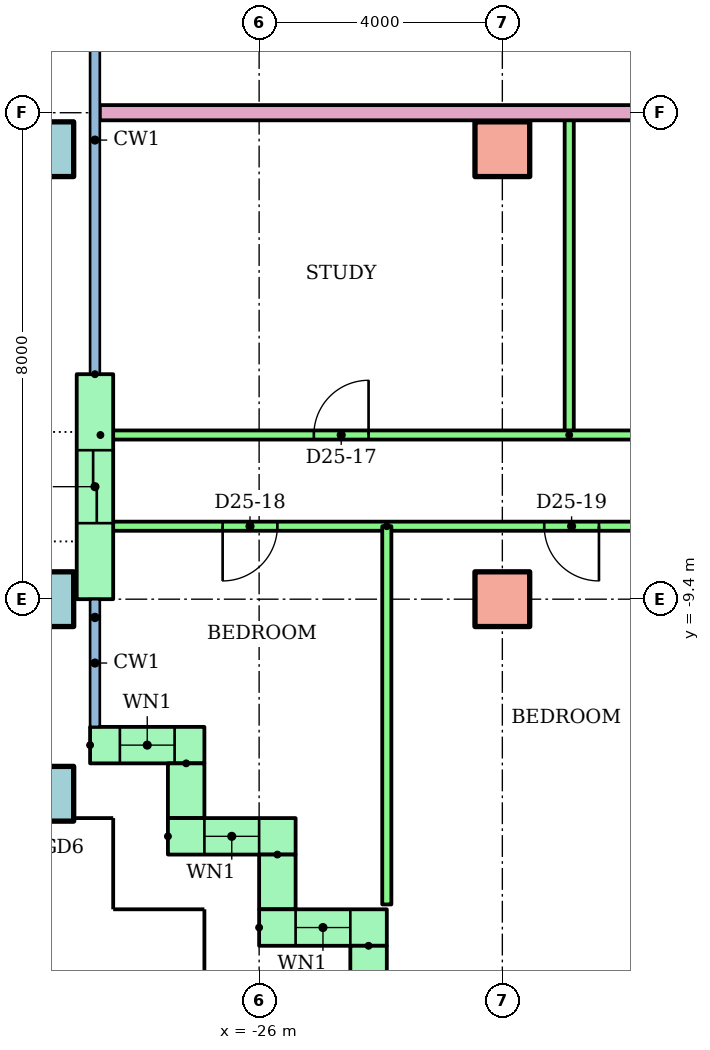
"""IFC4 building model, lengths in metres.
Left out: names, types, materials, properties, quantities, classifications, styles, units other than length and angle.
Written with IfcOpenShell. Run it as: python <this file> out.ifc"""

import sys

from ifc_helpers import new_model, si_unit, direction, frame, frame_2d, origin, origin_2d, place, context, subcontext, project, spatial, rectangle, hollow_rectangle, extrude, element, fill, save


model = new_model("IFC4")
c1 = context("Model", 3, precision=1e-05, world=origin(), true_north=direction((0.0, 1.0)))
c2 = subcontext(c1, "Body", "Model", "MODEL_VIEW")
j1 = project(units=[si_unit("LENGTHUNIT", "METRE"), si_unit("PLANEANGLEUNIT", "RADIAN")], contexts=[c1])
p1 = place(None, origin())
s1 = spatial("IfcSite", under=j1, at=p1, CompositionType="ELEMENT")
p2 = place(p1, origin())
s2 = spatial("IfcBuilding", under=s1, at=p2, CompositionType="ELEMENT")
p3 = place(p2, frame((0.0, 0.0, 96.7)))
s3 = spatial("IfcBuildingStorey", under=s2, at=p3, CompositionType="ELEMENT", Elevation=96.7)
for number, where in (
    (1, (-29.5, -12.6, 0.0)),
    (2, (-29.5, -9.4, 0.0)),
):
    element("IfcColumn", number, at=place(p3, frame(where)), inside=s3, PredefinedType="COLUMN", context=c2, shape_type="SweptSolid", body=[
        extrude(hollow_rectangle(XDim=0.9, YDim=0.9, WallThickness=0.045, at=origin_2d()), origin(), (0.0, 0.0, 1.0), 3.2),
    ])
p4 = place(p3, frame((-22.0, -9.4, 0.0)))
e3 = element("IfcColumn", 3, at=p4, inside=s3, PredefinedType="COLUMN", context=c2, shape_type="SweptSolid", body=[
    extrude(rectangle(XDim=0.9, YDim=0.9, at=origin_2d()), origin(), (0.0, 0.0, 1.0), 3.2),
])
p5 = place(p3, frame((-29.5, -2.0, 0.0)))
e4 = element("IfcColumn", 4, at=p5, inside=s3, PredefinedType="COLUMN", context=c2, shape_type="SweptSolid", body=[
    extrude(hollow_rectangle(XDim=0.9, YDim=0.9, WallThickness=0.045, at=origin_2d()), origin(), (0.0, 0.0, 1.0), 3.2),
])
p6 = place(p3, frame((-22.0, -2.0, 0.0)))
e5 = element("IfcColumn", 5, at=p6, inside=s3, PredefinedType="COLUMN", context=c2, shape_type="SweptSolid", body=[
    extrude(rectangle(XDim=0.9, YDim=0.9, at=origin_2d()), origin(), (0.0, 0.0, 1.0), 3.2),
])
p7 = place(p3, frame((-28.7, -5.7, 0.0), z_axis=(0.0, 0.0, 1.0), x_axis=(0.0, -1.0, 0.0)))
e6 = element("IfcWall", 6, at=p7, inside=s3, PredefinedType="STANDARD", context=c2, shape_type="SweptSolid", body=[
    extrude(rectangle(XDim=3.7, YDim=0.6, at=frame_2d((1.85, 0.0))), origin(), (0.0, 0.0, 1.0), 2.92),
])
p8 = place(p7, frame((1.25, 0.0, 0.0)))
e7 = element("IfcOpeningElement", 7, at=p8, cuts=e6, PredefinedType="OPENING", context=c2, shape_type="SweptSolid", body=[
    extrude(rectangle(XDim=1.2, YDim=2.1, at=frame_2d((0.6, 1.05))), frame((0.0, 0.31, 0.0), z_axis=(0.0, -1.0, 0.0), x_axis=(1.0, 0.0, 0.0)), (0.0, 0.0, 1.0), 0.62),
])
p9 = place(p3, frame((-28.78, -11.8, 0.0)))
e8 = element("IfcWall", 8, at=p9, inside=s3, PredefinedType="STANDARD", context=c2, shape_type="SweptSolid", body=[
    extrude(rectangle(XDim=1.88, YDim=0.6, at=frame_2d((0.94, 0.0))), origin(), (0.0, 0.0, 1.0), 2.92),
])
p10 = place(p9, frame((0.49, 0.0, 0.9)))
e9 = element("IfcOpeningElement", 9, at=p10, cuts=e8, PredefinedType="OPENING", context=c2, shape_type="SweptSolid", body=[
    extrude(rectangle(XDim=0.9, YDim=1.5, at=frame_2d((0.45, 0.75))), frame((0.0, 0.31, 0.0), z_axis=(0.0, -1.0, 0.0), x_axis=(1.0, 0.0, 0.0)), (0.0, 0.0, 1.0), 0.62),
])
p11 = place(p3, frame((-27.2, -12.1, 0.0), z_axis=(0.0, 0.0, 1.0), x_axis=(0.0, -1.0, 0.0)))
e10 = element("IfcWall", 10, at=p11, inside=s3, PredefinedType="STANDARD", context=c2, shape_type="SweptSolid", body=[
    extrude(rectangle(XDim=0.9, YDim=0.6, at=frame_2d((0.45, 0.0))), origin(), (0.0, 0.0, 1.0), 2.92),
])
p12 = place(p3, frame((-27.5, -13.3, 0.0)))
e11 = element("IfcWall", 11, at=p12, inside=s3, PredefinedType="STANDARD", context=c2, shape_type="SweptSolid", body=[
    extrude(rectangle(XDim=2.1, YDim=0.6, at=frame_2d((1.05, 0.0))), origin(), (0.0, 0.0, 1.0), 2.92),
])
p13 = place(p12, frame((0.6, 0.0, 0.9)))
e12 = element("IfcOpeningElement", 12, at=p13, cuts=e11, PredefinedType="OPENING", context=c2, shape_type="SweptSolid", body=[
    extrude(rectangle(XDim=0.9, YDim=1.5, at=frame_2d((0.45, 0.75))), frame((0.0, 0.31, 0.0), z_axis=(0.0, -1.0, 0.0), x_axis=(1.0, 0.0, 0.0)), (0.0, 0.0, 1.0), 0.62),
])
p14 = place(p3, frame((-25.7, -13.6, 0.0), z_axis=(0.0, 0.0, 1.0), x_axis=(0.0, -1.0, 0.0)))
e13 = element("IfcWall", 13, at=p14, inside=s3, PredefinedType="STANDARD", context=c2, shape_type="SweptSolid", body=[
    extrude(rectangle(XDim=0.9, YDim=0.6, at=frame_2d((0.45, 0.0))), origin(), (0.0, 0.0, 1.0), 2.92),
])
p15 = place(p3, frame((-26.0, -14.8, 0.0)))
e14 = element("IfcWall", 14, at=p15, inside=s3, PredefinedType="STANDARD", context=c2, shape_type="SweptSolid", body=[
    extrude(rectangle(XDim=2.1, YDim=0.6, at=frame_2d((1.05, 0.0))), origin(), (0.0, 0.0, 1.0), 2.92),
])
p16 = place(p15, frame((0.6, 0.0, 0.9)))
e15 = element("IfcOpeningElement", 15, at=p16, cuts=e14, PredefinedType="OPENING", context=c2, shape_type="SweptSolid", body=[
    extrude(rectangle(XDim=0.9, YDim=1.5, at=frame_2d((0.45, 0.75))), frame((0.0, 0.31, 0.0), z_axis=(0.0, -1.0, 0.0), x_axis=(1.0, 0.0, 0.0)), (0.0, 0.0, 1.0), 0.62),
])
p17 = place(p3, frame((-24.2, -15.1, 0.0), z_axis=(0.0, 0.0, 1.0), x_axis=(0.0, -1.0, 0.0)))
e16 = element("IfcWall", 16, at=p17, inside=s3, PredefinedType="STANDARD", context=c2, shape_type="SweptSolid", body=[
    extrude(rectangle(XDim=1.28, YDim=0.6, at=frame_2d((0.64, 0.0))), origin(), (0.0, 0.0, 1.0), 2.92),
])
p18 = place(p3, frame((-20.9, -6.7, 0.0), z_axis=(0.0, 0.0, 1.0), x_axis=(0.0, 1.0, 0.0)))
e17 = element("IfcWall", 17, at=p18, inside=s3, PredefinedType="PARTITIONING", context=c2, shape_type="SweptSolid", body=[
    extrude(rectangle(XDim=5.3, YDim=0.15, at=frame_2d((2.65, 0.0))), origin(), (0.0, 0.0, 1.0), 2.4),
])
p19 = place(p3, frame((-28.61, -6.7, 0.0)))
e18 = element("IfcWall", 18, at=p19, inside=s3, PredefinedType="PARTITIONING", context=c2, shape_type="SweptSolid", body=[
    extrude(rectangle(XDim=20.61, YDim=0.15, at=frame_2d((10.305, 0.0))), origin(), (0.0, 0.0, 1.0), 2.4),
])
p20 = place(p19, frame((15.51, 0.0, 0.0)))
e19 = element("IfcOpeningElement", 19, at=p20, cuts=e18, PredefinedType="OPENING", context=c2, shape_type="SweptSolid", body=[
    extrude(rectangle(XDim=0.9, YDim=2.1, at=frame_2d((0.45, 1.05))), frame((0.0, 0.085, 0.0), z_axis=(0.0, -1.0, 0.0), x_axis=(1.0, 0.0, 0.0)), (0.0, 0.0, 1.0), 0.17),
])
p21 = place(p19, frame((10.26, 0.0, 0.0)))
e20 = element("IfcOpeningElement", 20, at=p21, cuts=e18, PredefinedType="OPENING", context=c2, shape_type="SweptSolid", body=[
    extrude(rectangle(XDim=0.9, YDim=2.1, at=frame_2d((0.45, 1.05))), frame((0.0, 0.085, 0.0), z_axis=(0.0, -1.0, 0.0), x_axis=(1.0, 0.0, 0.0)), (0.0, 0.0, 1.0), 0.17),
])
p22 = place(p19, frame((3.51, 0.0, 0.0)))
e21 = element("IfcOpeningElement", 21, at=p22, cuts=e18, PredefinedType="OPENING", context=c2, shape_type="SweptSolid", body=[
    extrude(rectangle(XDim=0.9, YDim=2.1, at=frame_2d((0.45, 1.05))), frame((0.0, 0.085, 0.0), z_axis=(0.0, -1.0, 0.0), x_axis=(1.0, 0.0, 0.0)), (0.0, 0.0, 1.0), 0.17),
])
p23 = place(p3, frame((-6.0, -8.2, 0.0), z_axis=(0.0, 0.0, 1.0), x_axis=(-1.0, 0.0, 0.0)))
e22 = element("IfcWall", 22, at=p23, inside=s3, PredefinedType="PARTITIONING", context=c2, shape_type="SweptSolid", body=[
    extrude(rectangle(XDim=22.61, YDim=0.15, at=frame_2d((11.305, 0.0))), origin(), (0.0, 0.0, 1.0), 2.4),
])
p24 = place(p23, frame((19.7, 0.0, 0.0)))
e23 = element("IfcOpeningElement", 23, at=p24, cuts=e22, PredefinedType="OPENING", context=c2, shape_type="SweptSolid", body=[
    extrude(rectangle(XDim=0.9, YDim=2.1, at=frame_2d((0.45, 1.05))), frame((0.0, 0.085, 0.0), z_axis=(0.0, -1.0, 0.0), x_axis=(1.0, 0.0, 0.0)), (0.0, 0.0, 1.0), 0.17),
])
p25 = place(p23, frame((14.411, 0.0, 0.0)))
e24 = element("IfcOpeningElement", 24, at=p25, cuts=e22, PredefinedType="OPENING", context=c2, shape_type="SweptSolid", body=[
    extrude(rectangle(XDim=0.9, YDim=2.1, at=frame_2d((0.45, 1.05))), frame((0.0, 0.085, 0.0), z_axis=(0.0, -1.0, 0.0), x_axis=(1.0, 0.0, 0.0)), (0.0, 0.0, 1.0), 0.17),
])
p26 = place(p23, frame((9.55, 0.0, 0.0)))
e25 = element("IfcOpeningElement", 25, at=p26, cuts=e22, PredefinedType="OPENING", context=c2, shape_type="SweptSolid", body=[
    extrude(rectangle(XDim=0.9, YDim=2.1, at=frame_2d((0.45, 1.05))), frame((0.0, 0.085, 0.0), z_axis=(0.0, -1.0, 0.0), x_axis=(1.0, 0.0, 0.0)), (0.0, 0.0, 1.0), 0.17),
])
p27 = place(p23, frame((3.5, 0.0, 0.0)))
e26 = element("IfcOpeningElement", 26, at=p27, cuts=e22, PredefinedType="OPENING", context=c2, shape_type="SweptSolid", body=[
    extrude(rectangle(XDim=1.0, YDim=2.1, at=frame_2d((0.5, 1.05))), frame((0.0, 0.085, 0.0), z_axis=(0.0, -1.0, 0.0), x_axis=(1.0, 0.0, 0.0)), (0.0, 0.0, 1.0), 0.17),
])
p28 = place(p3, frame((-23.9, -8.2, 0.0), z_axis=(0.0, 0.0, 1.0), x_axis=(0.0, -1.0, 0.0)))
e27 = element("IfcWall", 27, at=p28, inside=s3, PredefinedType="PARTITIONING", context=c2, shape_type="SweptSolid", body=[
    extrude(rectangle(XDim=6.22, YDim=0.15, at=frame_2d((3.11, 0.0))), origin(), (0.0, 0.0, 1.0), 2.4),
])
p29 = place(p3, frame((-14.0, -1.4, 0.0), z_axis=(0.0, 0.0, 1.0), x_axis=(-1.0, 0.0, 0.0)))
e28 = element("IfcWall", 28, at=p29, inside=s3, PredefinedType="PARTITIONING", context=c2, shape_type="SweptSolid", body=[
    extrude(rectangle(XDim=14.62, YDim=0.25, at=frame_2d((7.31, 0.0))), origin(), (0.0, 0.0, 1.0), 2.4),
])
p30 = place(p10, origin())
e29 = element("IfcWindow", 29, at=p30, inside=s3, PartitioningType="SINGLE_PANEL", PredefinedType="WINDOW", context=c2, shape_type="SweptSolid", body=[
    extrude(rectangle(XDim=0.9, YDim=1.5, at=frame_2d((0.45, 0.75))), frame((0.0, 0.03, 0.0), z_axis=(0.0, -1.0, 0.0), x_axis=(1.0, 0.0, 0.0)), (0.0, 0.0, 1.0), 0.06),
])
fill(e9, e29)
p31 = place(p13, origin())
e30 = element("IfcWindow", 30, at=p31, inside=s3, PartitioningType="SINGLE_PANEL", PredefinedType="WINDOW", context=c2, shape_type="SweptSolid", body=[
    extrude(rectangle(XDim=0.9, YDim=1.5, at=frame_2d((0.45, 0.75))), frame((0.0, 0.03, 0.0), z_axis=(0.0, -1.0, 0.0), x_axis=(1.0, 0.0, 0.0)), (0.0, 0.0, 1.0), 0.06),
])
fill(e12, e30)
p32 = place(p16, origin())
e31 = element("IfcWindow", 31, at=p32, inside=s3, PartitioningType="SINGLE_PANEL", PredefinedType="WINDOW", context=c2, shape_type="SweptSolid", body=[
    extrude(rectangle(XDim=0.9, YDim=1.5, at=frame_2d((0.45, 0.75))), frame((0.0, 0.03, 0.0), z_axis=(0.0, -1.0, 0.0), x_axis=(1.0, 0.0, 0.0)), (0.0, 0.0, 1.0), 0.06),
])
fill(e15, e31)
p33 = place(p22, origin())
e32 = element("IfcDoor", 32, at=p33, inside=s3, OperationType="SINGLE_SWING_RIGHT", PredefinedType="DOOR", context=c2, shape_type="SweptSolid", body=[
    extrude(rectangle(XDim=0.9, YDim=2.1, at=frame_2d((0.45, 1.05))), frame((0.0, 0.025, 0.0), z_axis=(0.0, -1.0, 0.0), x_axis=(1.0, 0.0, 0.0)), (0.0, 0.0, 1.0), 0.05),
])
fill(e21, e32)
p34 = place(p24, origin())
e33 = element("IfcDoor", 33, at=p34, inside=s3, OperationType="SINGLE_SWING_RIGHT", PredefinedType="DOOR", context=c2, shape_type="SweptSolid", body=[
    extrude(rectangle(XDim=0.9, YDim=2.1, at=frame_2d((0.45, 1.05))), frame((0.0, 0.025, 0.0), z_axis=(0.0, -1.0, 0.0), x_axis=(1.0, 0.0, 0.0)), (0.0, 0.0, 1.0), 0.05),
])
fill(e23, e33)
p35 = place(p25, origin())
e34 = element("IfcDoor", 34, at=p35, inside=s3, OperationType="SINGLE_SWING_LEFT", PredefinedType="DOOR", context=c2, shape_type="SweptSolid", body=[
    extrude(rectangle(XDim=0.9, YDim=2.1, at=frame_2d((0.45, 1.05))), frame((0.0, 0.025, 0.0), z_axis=(0.0, -1.0, 0.0), x_axis=(1.0, 0.0, 0.0)), (0.0, 0.0, 1.0), 0.05),
])
fill(e24, e34)
p36 = place(p8, origin())
e35 = element("IfcDoor", 35, at=p36, inside=s3, OperationType="SLIDING_TO_LEFT", PredefinedType="DOOR", context=c2, shape_type="SweptSolid", body=[
    extrude(rectangle(XDim=1.2, YDim=2.1, at=frame_2d((0.6, 1.05))), frame((0.0, 0.025, 0.0), z_axis=(0.0, -1.0, 0.0), x_axis=(1.0, 0.0, 0.0)), (0.0, 0.0, 1.0), 0.05),
])
fill(e7, e35)
save(model, sys.argv[1])
